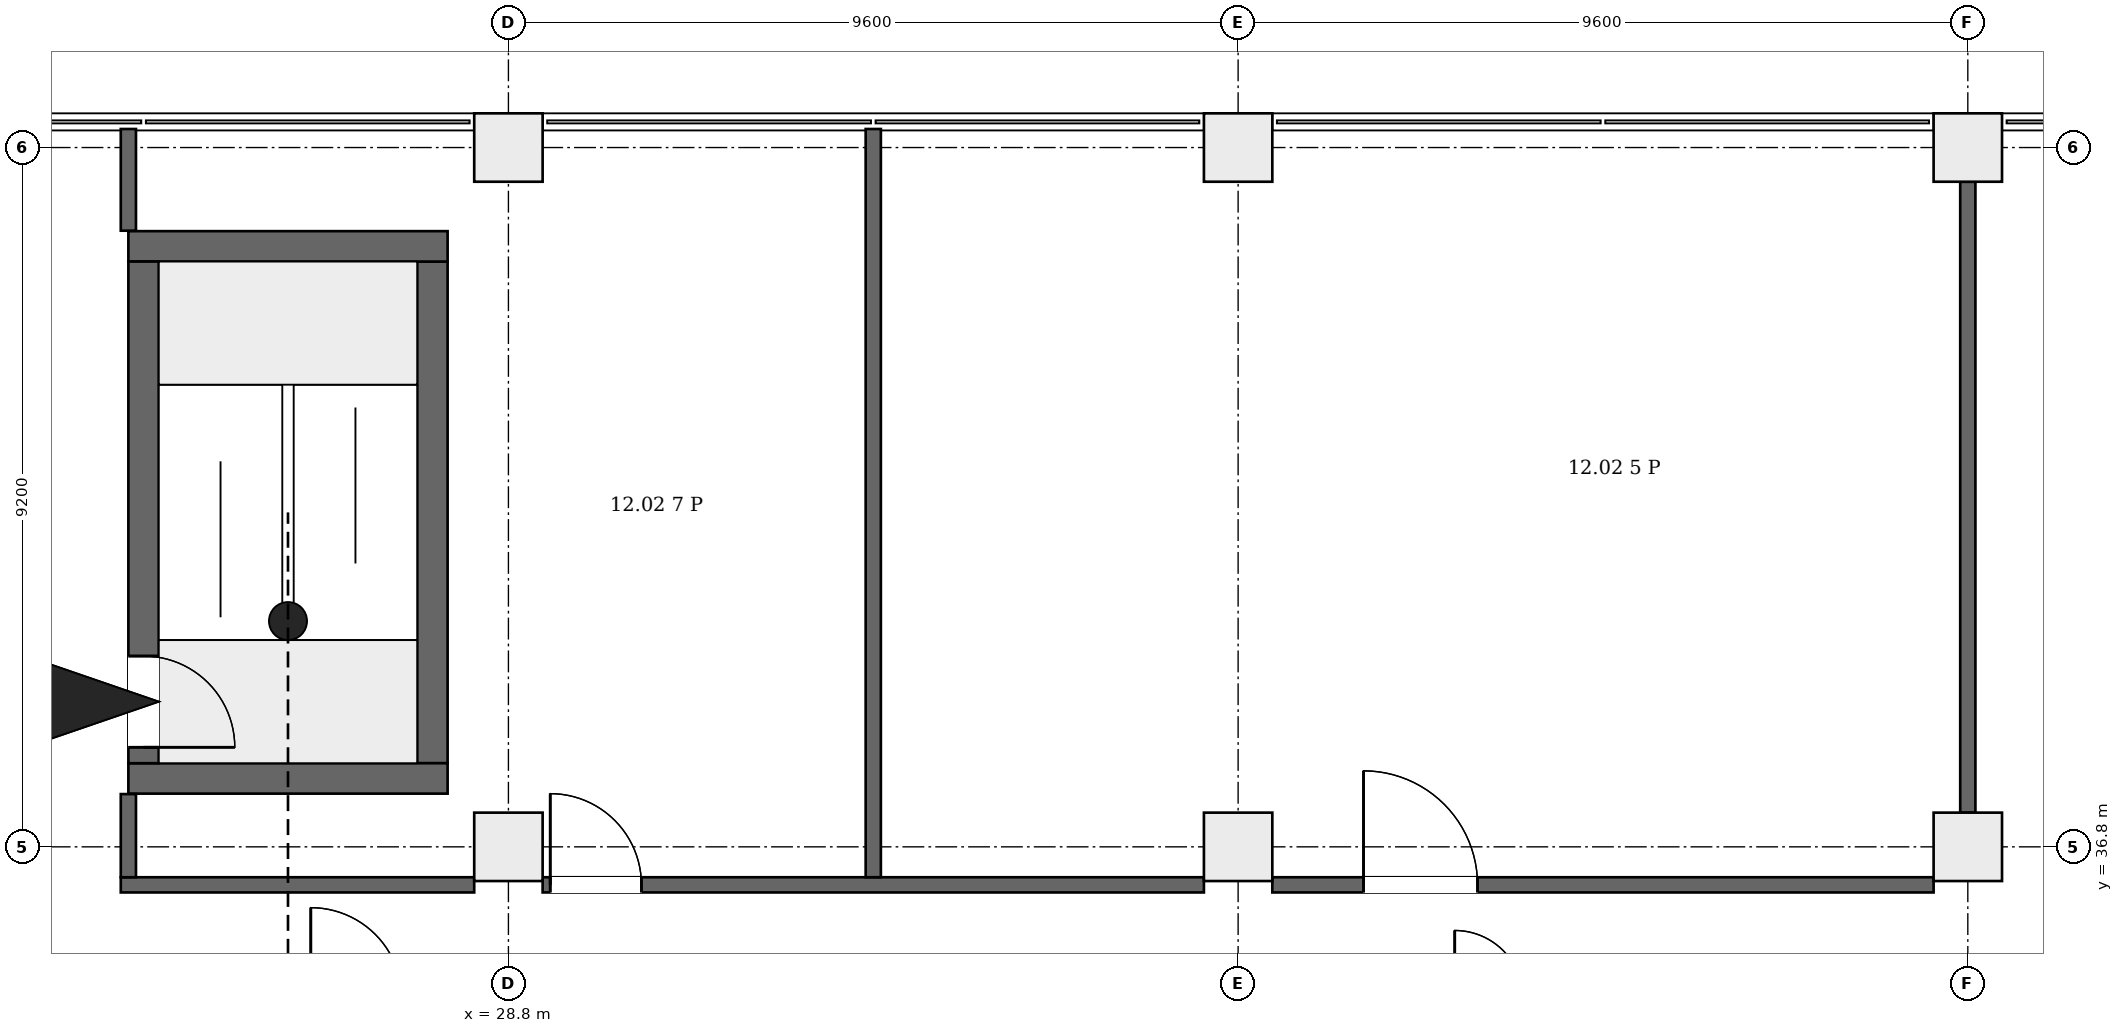
"""IFC4 building model, lengths in metres.
Left out: names, types, materials, properties, quantities, classifications, styles, units other than length and angle.
Written with IfcOpenShell. Run it as: python <this file> out.ifc"""

import sys

from ifc_helpers import new_model, si_unit, direction, frame, frame_2d, origin, origin_2d, place, context, subcontext, project, spatial, rectangle, extrude, element, fill, save


model = new_model("IFC4")
c1 = context("Model", 3, precision=1e-05, world=origin(), true_north=direction((0.0, 1.0)))
c2 = subcontext(c1, "Body", "Model", "MODEL_VIEW")
j1 = project(units=[si_unit("LENGTHUNIT", "METRE"), si_unit("PLANEANGLEUNIT", "RADIAN")], contexts=[c1])
p1 = place(None, origin())
s1 = spatial("IfcSite", under=j1, at=p1, CompositionType="ELEMENT")
p2 = place(p1, origin())
s2 = spatial("IfcBuilding", under=s1, at=p2, CompositionType="ELEMENT")
p3 = place(p2, frame((0.0, 0.0, 61.3)))
s3 = spatial("IfcBuildingStorey", under=s2, at=p3, CompositionType="ELEMENT", Elevation=61.3)
for number, where, z_axis, x_axis in (
    (1, (23.8, 37.7, 0.0), (0.0, 0.0, 1.0), (1.0, 0.0, 0.0)),
    (2, (23.8, 44.7, 0.0), (0.0, 0.0, 1.0), (1.0, 0.0, 0.0)),
):
    element("IfcWall", number, at=place(p3, frame(where, z_axis=z_axis, x_axis=x_axis)), inside=s3, PredefinedType="SHEAR", context=c2, shape_type="SweptSolid", body=[
        extrude(rectangle(XDim=4.2, YDim=0.4, at=frame_2d((2.1, 0.0))), origin(), (0.0, 0.0, 1.0), 4.2),
    ])
p4 = place(p3, frame((24.0, 37.9, 0.0), z_axis=(0.0, 0.0, 1.0), x_axis=(0.0, 1.0, 0.0)))
e3 = element("IfcWall", 3, at=p4, inside=s3, PredefinedType="SHEAR", context=c2, shape_type="SweptSolid", body=[
    extrude(rectangle(XDim=6.6, YDim=0.4, at=frame_2d((3.3, 0.0))), origin(), (0.0, 0.0, 1.0), 4.2),
])
p5 = place(p4, frame((0.21, 0.0, 0.0)))
e4 = element("IfcOpeningElement", 4, at=p5, cuts=e3, PredefinedType="OPENING", context=c2, shape_type="SweptSolid", body=[
    extrude(rectangle(XDim=1.2, YDim=2.1, at=frame_2d((0.6, 1.05))), frame((0.0, 0.21, 0.0), z_axis=(0.0, -1.0, 0.0), x_axis=(1.0, 0.0, 0.0)), (0.0, 0.0, 1.0), 0.42),
])
p6 = place(p3, frame((27.8, 37.9, 0.0), z_axis=(0.0, 0.0, 1.0), x_axis=(0.0, 1.0, 0.0)))
e5 = element("IfcWall", 5, at=p6, inside=s3, PredefinedType="SHEAR", context=c2, shape_type="SweptSolid", body=[
    extrude(rectangle(XDim=6.6, YDim=0.4, at=frame_2d((3.3, 0.0))), origin(), (0.0, 0.0, 1.0), 4.2),
])
for number, where, z_axis, x_axis in (
    (6, (28.8, 36.8, 0.0), (0.0, 0.0, 1.0), (1.0, 0.0, 0.0)),
    (7, (38.4, 36.8, 0.0), (0.0, 0.0, 1.0), (1.0, 0.0, 0.0)),
    (8, (48.0, 36.8, 0.0), (0.0, 0.0, 1.0), (1.0, 0.0, 0.0)),
    (9, (28.8, 46.0, 0.0), (0.0, 0.0, 1.0), (1.0, 0.0, 0.0)),
    (10, (38.4, 46.0, 0.0), (0.0, 0.0, 1.0), (1.0, 0.0, 0.0)),
    (11, (48.0, 46.0, 0.0), (0.0, 0.0, 1.0), (1.0, 0.0, 0.0)),
):
    element("IfcColumn", number, at=place(p3, frame(where, z_axis=z_axis, x_axis=x_axis)), inside=s3, PredefinedType="COLUMN", context=c2, shape_type="SweptSolid", body=[
        extrude(rectangle(XDim=0.9, YDim=0.9, at=origin_2d()), origin(), (0.0, 0.0, 1.0), 4.2),
    ])
p7 = place(p3, frame((23.7, 36.3, 0.0), z_axis=(0.0, 0.0, 1.0), x_axis=(1.0, 0.0, 0.0)))
e12 = element("IfcWall", 12, at=p7, inside=s3, PredefinedType="PARTITIONING", context=c2, shape_type="SweptSolid", body=[
    extrude(rectangle(XDim=4.65, YDim=0.2, at=frame_2d((2.325, 0.0))), origin(), (0.0, 0.0, 1.0), 3.9),
])
p8 = place(p3, frame((23.8, 36.4, 0.0), z_axis=(0.0, 0.0, 1.0), x_axis=(0.0, 1.0, 0.0)))
e13 = element("IfcWall", 13, at=p8, inside=s3, PredefinedType="PARTITIONING", context=c2, shape_type="SweptSolid", body=[
    extrude(rectangle(XDim=1.094, YDim=0.2, at=frame_2d((0.547, 0.0))), origin(), (0.0, 0.0, 1.0), 3.9),
])
p9 = place(p3, frame((23.8, 44.906, 0.0), z_axis=(0.0, 0.0, 1.0), x_axis=(0.0, 1.0, 0.0)))
e14 = element("IfcWall", 14, at=p9, inside=s3, PredefinedType="PARTITIONING", context=c2, shape_type="SweptSolid", body=[
    extrude(rectangle(XDim=1.338, YDim=0.2, at=frame_2d((0.669, 0.0))), origin(), (0.0, 0.0, 1.0), 3.9),
])
p10 = place(p3, frame((29.25, 36.3, 0.0), z_axis=(0.0, 0.0, 1.0), x_axis=(1.0, 0.0, 0.0)))
e15 = element("IfcWall", 15, at=p10, inside=s3, PredefinedType="PARTITIONING", context=c2, shape_type="SweptSolid", body=[
    extrude(rectangle(XDim=8.7, YDim=0.2, at=frame_2d((4.35, 0.0))), origin(), (0.0, 0.0, 1.0), 3.9),
])
p11 = place(p10, frame((0.1, 0.0, 0.0)))
e16 = element("IfcOpeningElement", 16, at=p11, cuts=e15, PredefinedType="OPENING", context=c2, shape_type="SweptSolid", body=[
    extrude(rectangle(XDim=1.2, YDim=2.1, at=frame_2d((0.6, 1.05))), frame((0.0, 0.11, 0.0), z_axis=(0.0, -1.0, 0.0), x_axis=(1.0, 0.0, 0.0)), (0.0, 0.0, 1.0), 0.22),
])
p12 = place(p3, frame((33.6, 36.4, 0.0), z_axis=(0.0, 0.0, 1.0), x_axis=(0.0, 1.0, 0.0)))
e17 = element("IfcWall", 17, at=p12, inside=s3, PredefinedType="PARTITIONING", context=c2, shape_type="SweptSolid", body=[
    extrude(rectangle(XDim=9.844, YDim=0.2, at=frame_2d((4.922, 0.0))), origin(), (0.0, 0.0, 1.0), 3.9),
])
p13 = place(p3, frame((38.85, 36.3, 0.0), z_axis=(0.0, 0.0, 1.0), x_axis=(1.0, 0.0, 0.0)))
e18 = element("IfcWall", 18, at=p13, inside=s3, PredefinedType="PARTITIONING", context=c2, shape_type="SweptSolid", body=[
    extrude(rectangle(XDim=8.7, YDim=0.2, at=frame_2d((4.35, 0.0))), origin(), (0.0, 0.0, 1.0), 3.9),
])
p14 = place(p13, frame((1.2, 0.0, 0.0)))
e19 = element("IfcOpeningElement", 19, at=p14, cuts=e18, PredefinedType="OPENING", context=c2, shape_type="SweptSolid", body=[
    extrude(rectangle(XDim=1.5, YDim=2.1, at=frame_2d((0.75, 1.05))), frame((0.0, 0.11, 0.0), z_axis=(0.0, -1.0, 0.0), x_axis=(1.0, 0.0, 0.0)), (0.0, 0.0, 1.0), 0.22),
])
p15 = place(p3, frame((48.0, 37.25, 0.0), z_axis=(0.0, 0.0, 1.0), x_axis=(0.0, 1.0, 0.0)))
e20 = element("IfcWall", 20, at=p15, inside=s3, PredefinedType="PARTITIONING", context=c2, shape_type="SweptSolid", body=[
    extrude(rectangle(XDim=8.3, YDim=0.2, at=frame_2d((4.15, 0.0))), origin(), (0.0, 0.0, 1.0), 3.3),
])
p16 = place(p5, origin())
e21 = element("IfcDoor", 21, at=p16, inside=s3, OperationType="SINGLE_SWING_LEFT", PredefinedType="DOOR", context=c2, shape_type="SweptSolid", body=[
    extrude(rectangle(XDim=1.2, YDim=2.1, at=frame_2d((0.6, 1.05))), frame((0.0, 0.025, 0.0), z_axis=(0.0, -1.0, 0.0), x_axis=(1.0, 0.0, 0.0)), (0.0, 0.0, 1.0), 0.05),
])
fill(e4, e21)
p17 = place(p11, origin())
e22 = element("IfcDoor", 22, at=p17, inside=s3, OperationType="SINGLE_SWING_LEFT", PredefinedType="DOOR", context=c2, shape_type="SweptSolid", body=[
    extrude(rectangle(XDim=1.2, YDim=2.1, at=frame_2d((0.6, 1.05))), frame((0.0, 0.025, 0.0), z_axis=(0.0, -1.0, 0.0), x_axis=(1.0, 0.0, 0.0)), (0.0, 0.0, 1.0), 0.05),
])
fill(e16, e22)
p18 = place(p14, origin())
e23 = element("IfcDoor", 23, at=p18, inside=s3, OperationType="DOUBLE_DOOR_SINGLE_SWING", PredefinedType="DOOR", context=c2, shape_type="SweptSolid", body=[
    extrude(rectangle(XDim=1.5, YDim=2.1, at=frame_2d((0.75, 1.05))), frame((0.0, 0.025, 0.0), z_axis=(0.0, -1.0, 0.0), x_axis=(1.0, 0.0, 0.0)), (0.0, 0.0, 1.0), 0.05),
])
fill(e19, e23)
save(model, sys.argv[1])
